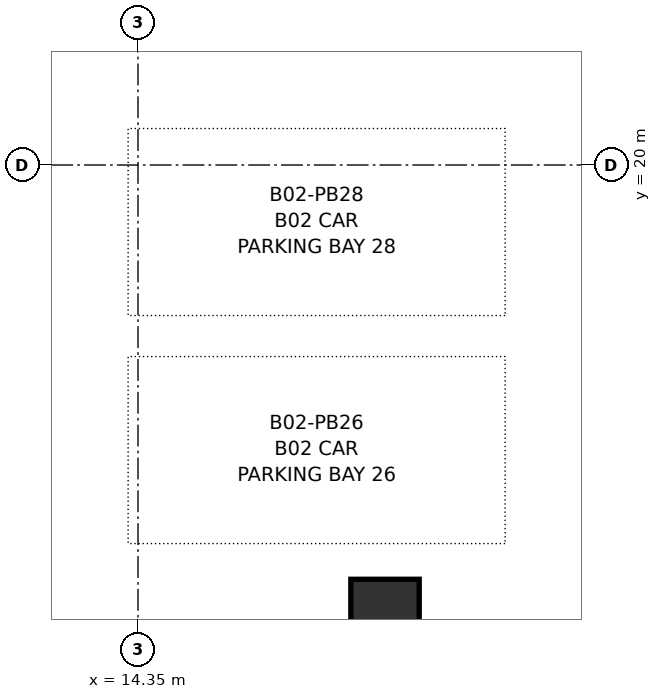
"""IFC4 building model, lengths in metres.
Left out: names, types, materials, properties, quantities, classifications, styles, units other than length and angle.
Written with IfcOpenShell. Run it as: python <this file> out.ifc"""

import sys

from ifc_helpers import new_model, si_unit, direction, frame, origin, origin_2d, place, context, subcontext, project, spatial, rectangle, extrude, source, transform, mapped, element, save


model = new_model("IFC4")
c1 = context("Model", 3, precision=1e-05, world=origin(), true_north=direction((0.0, 1.0)))
c2 = subcontext(c1, "Body", "Model", "MODEL_VIEW")
j1 = project(units=[si_unit("LENGTHUNIT", "METRE"), si_unit("PLANEANGLEUNIT", "RADIAN")], contexts=[c1])
p1 = place(None, origin())
s1 = spatial("IfcSite", under=j1, at=p1, CompositionType="ELEMENT")
p2 = place(p1, origin())
s2 = spatial("IfcBuilding", under=s1, at=p2, CompositionType="ELEMENT")
p3 = place(p2, frame((0.0, 0.0, -8.7)))
s3 = spatial("IfcBuildingStorey", under=s2, at=p3, CompositionType="ELEMENT", Elevation=-8.7)
m1 = source(origin(), c2, "Body", "SweptSolid", [
    extrude(rectangle(XDim=0.9, YDim=0.9, at=origin_2d()), origin(), (0.0, 0.0, 1.0), 4.2),
])
p4 = place(p3, frame((17.6, 14.1, 0.0), z_axis=(0.0, 0.0, 1.0), x_axis=(1.0, 0.0, 0.0)))
e1 = element("IfcColumn", 1, at=p4, inside=s3, PredefinedType="COLUMN", context=c2, shape_type="MappedRepresentation", body=[
    mapped(m1, transform((0.0, 0.0, 0.0), x_axis=(1.0, 0.0, 0.0), y_axis=(0.0, 1.0, 0.0), z_axis=(0.0, 0.0, 1.0), scale=1.0)),
])
save(model, sys.argv[1])
